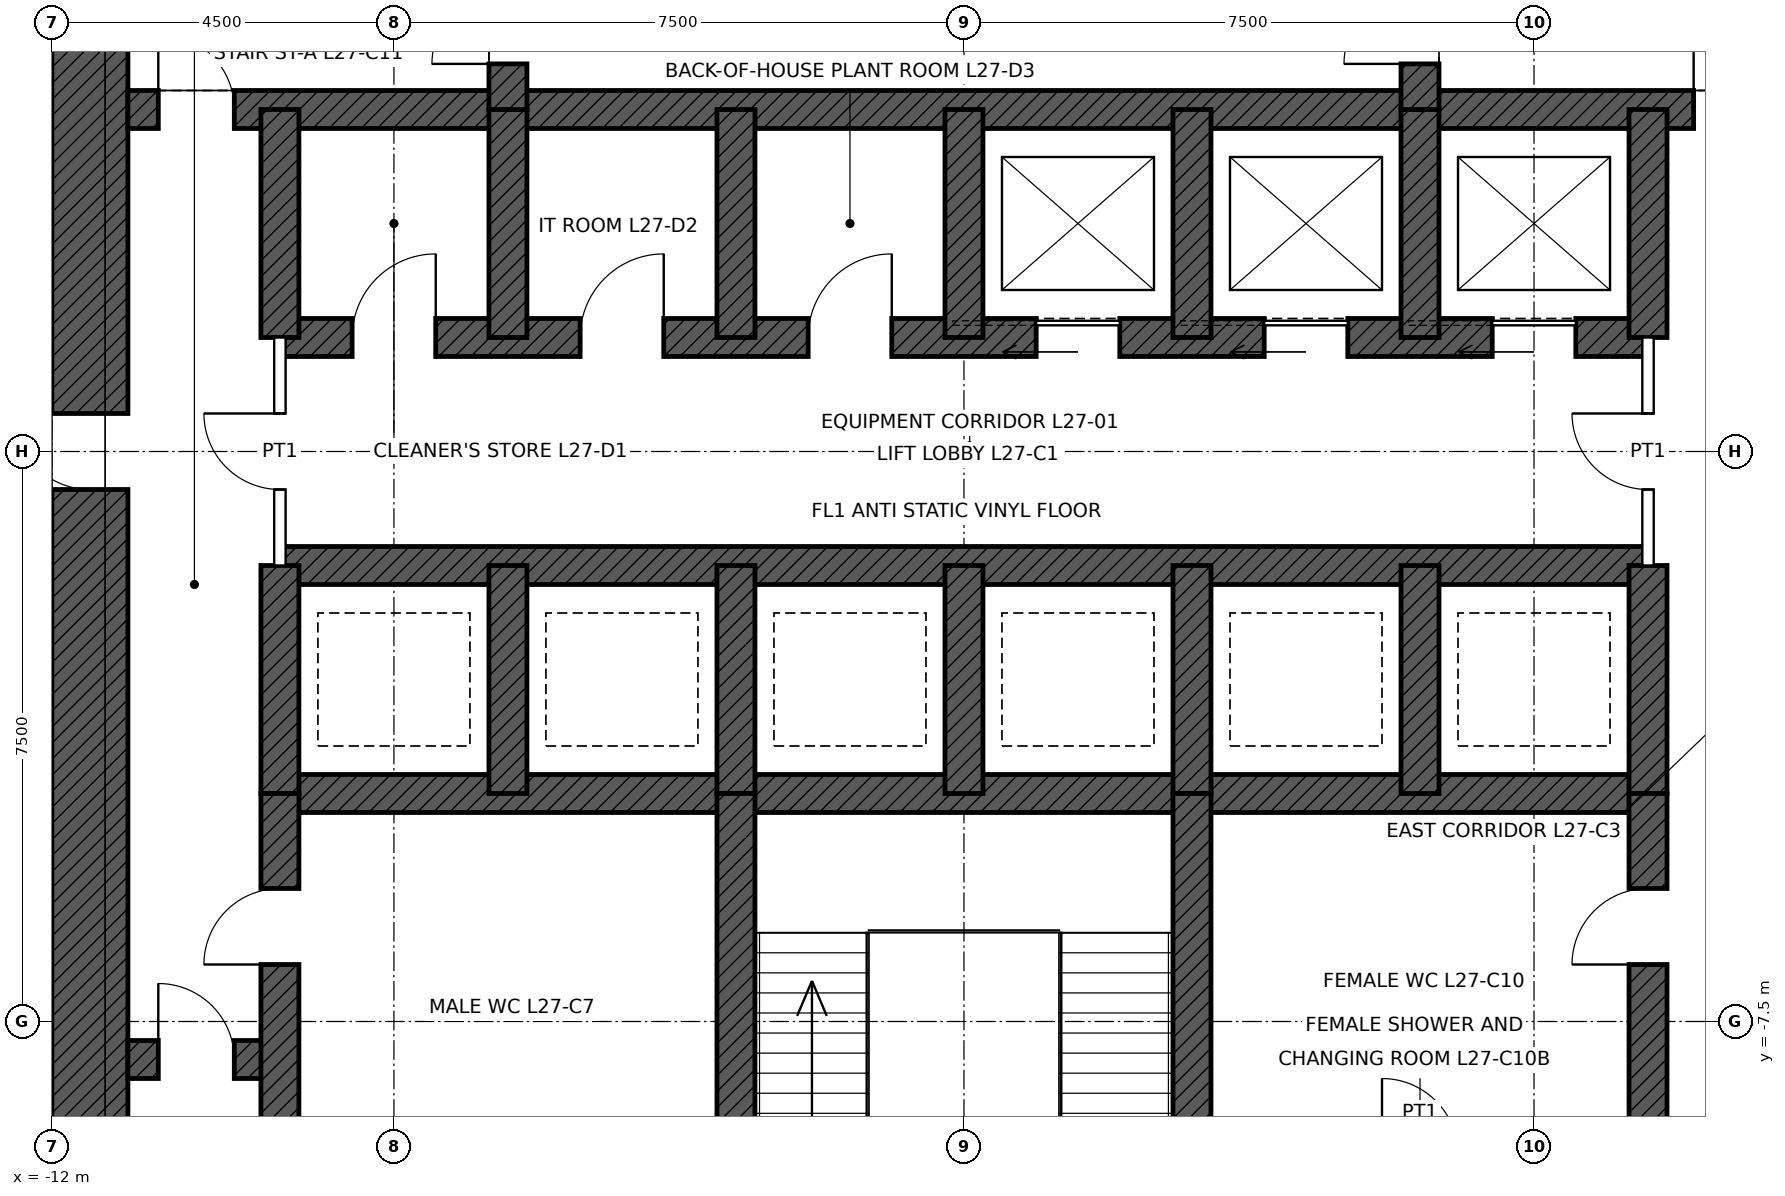
"""IFC4 building model, lengths in metres.
Left out: names, types, materials, properties, quantities, classifications, styles, units other than length and angle.
Written with IfcOpenShell. Run it as: python <this file> out.ifc"""

import sys

from ifc_helpers import new_model, si_unit, direction, frame, frame_2d, origin, place, context, subcontext, project, spatial, rectangle, extrude, element, fill, save


model = new_model("IFC4")
c1 = context("Model", 3, precision=1e-05, world=origin(), true_north=direction((0.0, 1.0)))
c2 = subcontext(c1, "Body", "Model", "MODEL_VIEW")
j1 = project(units=[si_unit("LENGTHUNIT", "METRE"), si_unit("PLANEANGLEUNIT", "RADIAN")], contexts=[c1])
p1 = place(None, origin())
s1 = spatial("IfcSite", under=j1, at=p1, CompositionType="ELEMENT")
p2 = place(p1, origin())
s2 = spatial("IfcBuilding", under=s1, at=p2, CompositionType="ELEMENT")
p3 = place(p2, frame((0.0, 0.0, 135.9)))
s3 = spatial("IfcBuildingStorey", under=s2, at=p3, CompositionType="ELEMENT", Elevation=135.9)
p4 = place(p3, frame((-11.5, -11.0, 0.0), z_axis=(0.0, 0.0, 1.0), x_axis=(0.0, 1.0, 0.0)))
e1 = element("IfcWall", 1, at=p4, inside=s3, PredefinedType="SHEAR", context=c2, shape_type="SweptSolid", body=[
    extrude(rectangle(XDim=22.0, YDim=1.0, at=frame_2d((11.0, 0.0))), origin(), (0.0, 0.0, 1.0), 4.5),
])
p5 = place(p4, frame((10.5, 0.0, 0.0)))
e2 = element("IfcOpeningElement", 2, at=p5, cuts=e1, PredefinedType="OPENING", context=c2, shape_type="SweptSolid", body=[
    extrude(rectangle(XDim=1.0, YDim=2.4, at=frame_2d((0.5, 1.2))), frame((0.0, 0.51, 0.0), z_axis=(0.0, -1.0, 0.0), x_axis=(1.0, 0.0, 0.0)), (0.0, 0.0, 1.0), 1.02),
])
p6 = place(p3, frame((-11.0, 4.5, 0.0), z_axis=(0.0, 0.0, 1.0), x_axis=(1.0, 0.0, 0.0)))
e3 = element("IfcWall", 3, at=p6, inside=s3, PredefinedType="SHEAR", context=c2, shape_type="SweptSolid", body=[
    extrude(rectangle(XDim=22.0, YDim=0.5, at=frame_2d((11.0, 0.0))), origin(), (0.0, 0.0, 1.0), 4.5),
])
p7 = place(p6, frame((0.4, 0.0, 0.0)))
e4 = element("IfcOpeningElement", 4, at=p7, cuts=e3, PredefinedType="OPENING", context=c2, shape_type="SweptSolid", body=[
    extrude(rectangle(XDim=1.0, YDim=2.1, at=frame_2d((0.5, 1.05))), frame((0.0, 0.26, 0.0), z_axis=(0.0, -1.0, 0.0), x_axis=(1.0, 0.0, 0.0)), (0.0, 0.0, 1.0), 0.52),
])
p8 = place(p6, frame((20.6, 0.0, 0.0)))
e5 = element("IfcOpeningElement", 5, at=p8, cuts=e3, PredefinedType="OPENING", context=c2, shape_type="SweptSolid", body=[
    extrude(rectangle(XDim=1.0, YDim=2.1, at=frame_2d((0.5, 1.05))), frame((0.0, 0.26, 0.0), z_axis=(0.0, -1.0, 0.0), x_axis=(1.0, 0.0, 0.0)), (0.0, 0.0, 1.0), 0.52),
])
p9 = place(p3, frame((-9.0, 1.5, 0.0), z_axis=(0.0, 0.0, 1.0), x_axis=(1.0, 0.0, 0.0)))
e6 = element("IfcWall", 6, at=p9, inside=s3, PredefinedType="SHEAR", context=c2, shape_type="SweptSolid", body=[
    extrude(rectangle(XDim=18.0, YDim=0.5, at=frame_2d((9.0, 0.0))), origin(), (0.0, 0.0, 1.0), 4.5),
])
p10 = place(p9, frame((9.95, 0.0, 0.0)))
e7 = element("IfcOpeningElement", 7, at=p10, cuts=e6, PredefinedType="OPENING", context=c2, shape_type="SweptSolid", body=[
    extrude(rectangle(XDim=1.1, YDim=2.1, at=frame_2d((0.55, 1.05))), frame((0.0, 0.26, 0.0), z_axis=(0.0, -1.0, 0.0), x_axis=(1.0, 0.0, 0.0)), (0.0, 0.0, 1.0), 0.52),
])
p11 = place(p9, frame((12.95, 0.0, 0.0)))
e8 = element("IfcOpeningElement", 8, at=p11, cuts=e6, PredefinedType="OPENING", context=c2, shape_type="SweptSolid", body=[
    extrude(rectangle(XDim=1.1, YDim=2.1, at=frame_2d((0.55, 1.05))), frame((0.0, 0.26, 0.0), z_axis=(0.0, -1.0, 0.0), x_axis=(1.0, 0.0, 0.0)), (0.0, 0.0, 1.0), 0.52),
])
p12 = place(p9, frame((15.95, 0.0, 0.0)))
e9 = element("IfcOpeningElement", 9, at=p12, cuts=e6, PredefinedType="OPENING", context=c2, shape_type="SweptSolid", body=[
    extrude(rectangle(XDim=1.1, YDim=2.1, at=frame_2d((0.55, 1.05))), frame((0.0, 0.26, 0.0), z_axis=(0.0, -1.0, 0.0), x_axis=(1.0, 0.0, 0.0)), (0.0, 0.0, 1.0), 0.52),
])
p13 = place(p9, frame((0.95, 0.0, 0.0)))
e10 = element("IfcOpeningElement", 10, at=p13, cuts=e6, PredefinedType="OPENING", context=c2, shape_type="SweptSolid", body=[
    extrude(rectangle(XDim=1.1, YDim=2.1, at=frame_2d((0.55, 1.05))), frame((0.0, 0.26, 0.0), z_axis=(0.0, -1.0, 0.0), x_axis=(1.0, 0.0, 0.0)), (0.0, 0.0, 1.0), 0.52),
])
p14 = place(p9, frame((3.95, 0.0, 0.0)))
e11 = element("IfcOpeningElement", 11, at=p14, cuts=e6, PredefinedType="OPENING", context=c2, shape_type="SweptSolid", body=[
    extrude(rectangle(XDim=1.1, YDim=2.1, at=frame_2d((0.55, 1.05))), frame((0.0, 0.26, 0.0), z_axis=(0.0, -1.0, 0.0), x_axis=(1.0, 0.0, 0.0)), (0.0, 0.0, 1.0), 0.52),
])
p15 = place(p9, frame((6.95, 0.0, 0.0)))
e12 = element("IfcOpeningElement", 12, at=p15, cuts=e6, PredefinedType="OPENING", context=c2, shape_type="SweptSolid", body=[
    extrude(rectangle(XDim=1.1, YDim=2.1, at=frame_2d((0.55, 1.05))), frame((0.0, 0.26, 0.0), z_axis=(0.0, -1.0, 0.0), x_axis=(1.0, 0.0, 0.0)), (0.0, 0.0, 1.0), 0.52),
])
for number, where, z_axis, x_axis in (
    (13, (-9.0, -1.5, 0.0), (0.0, 0.0, 1.0), (1.0, 0.0, 0.0)),
    (14, (-9.0, -4.5, 0.0), (0.0, 0.0, 1.0), (1.0, 0.0, 0.0)),
):
    element("IfcWall", number, at=place(p3, frame(where, z_axis=z_axis, x_axis=x_axis)), inside=s3, PredefinedType="SHEAR", context=c2, shape_type="SweptSolid", body=[
        extrude(rectangle(XDim=18.0, YDim=0.5, at=frame_2d((9.0, 0.0))), origin(), (0.0, 0.0, 1.0), 4.5),
    ])
p16 = place(p3, frame((-11.0, -8.0, 0.0), z_axis=(0.0, 0.0, 1.0), x_axis=(1.0, 0.0, 0.0)))
e15 = element("IfcWall", 15, at=p16, inside=s3, PredefinedType="SHEAR", context=c2, shape_type="SweptSolid", body=[
    extrude(rectangle(XDim=2.0, YDim=0.5, at=frame_2d((1.0, 0.0))), origin(), (0.0, 0.0, 1.0), 4.5),
])
p17 = place(p16, frame((0.4, 0.0, 0.0)))
e16 = element("IfcOpeningElement", 16, at=p17, cuts=e15, PredefinedType="OPENING", context=c2, shape_type="SweptSolid", body=[
    extrude(rectangle(XDim=1.0, YDim=2.1, at=frame_2d((0.5, 1.05))), frame((0.0, 0.26, 0.0), z_axis=(0.0, -1.0, 0.0), x_axis=(1.0, 0.0, 0.0)), (0.0, 0.0, 1.0), 0.52),
])
for number, where, z_axis, x_axis in (
    (17, (-9.0, 1.5, 0.0), (0.0, 0.0, 1.0), (0.0, 1.0, 0.0)),
    (18, (9.0, 1.5, 0.0), (0.0, 0.0, 1.0), (0.0, 1.0, 0.0)),
    (19, (-9.0, -4.5, 0.0), (0.0, 0.0, 1.0), (0.0, 1.0, 0.0)),
    (20, (9.0, -4.5, 0.0), (0.0, 0.0, 1.0), (0.0, 1.0, 0.0)),
    (21, (-6.0, 1.5, 0.0), (0.0, 0.0, 1.0), (0.0, 1.0, 0.0)),
    (22, (-3.0, 1.5, 0.0), (0.0, 0.0, 1.0), (0.0, 1.0, 0.0)),
    (23, (0.0, 1.5, 0.0), (0.0, 0.0, 1.0), (0.0, 1.0, 0.0)),
    (24, (3.0, 1.5, 0.0), (0.0, 0.0, 1.0), (0.0, 1.0, 0.0)),
    (25, (6.0, 1.5, 0.0), (0.0, 0.0, 1.0), (0.0, 1.0, 0.0)),
    (26, (-6.0, -4.5, 0.0), (0.0, 0.0, 1.0), (0.0, 1.0, 0.0)),
    (27, (-3.0, -4.5, 0.0), (0.0, 0.0, 1.0), (0.0, 1.0, 0.0)),
    (28, (0.0, -4.5, 0.0), (0.0, 0.0, 1.0), (0.0, 1.0, 0.0)),
    (29, (3.0, -4.5, 0.0), (0.0, 0.0, 1.0), (0.0, 1.0, 0.0)),
    (30, (6.0, -4.5, 0.0), (0.0, 0.0, 1.0), (0.0, 1.0, 0.0)),
):
    element("IfcWall", number, at=place(p3, frame(where, z_axis=z_axis, x_axis=x_axis)), inside=s3, PredefinedType="SHEAR", context=c2, shape_type="SweptSolid", body=[
        extrude(rectangle(XDim=3.0, YDim=0.5, at=frame_2d((1.5, 0.0))), origin(), (0.0, 0.0, 1.0), 4.5),
    ])
p18 = place(p3, frame((-6.0, 4.5, 0.0), z_axis=(0.0, 0.0, 1.0), x_axis=(0.0, 1.0, 0.0)))
e31 = element("IfcWall", 31, at=p18, inside=s3, PredefinedType="SHEAR", context=c2, shape_type="SweptSolid", body=[
    extrude(rectangle(XDim=6.5, YDim=0.5, at=frame_2d((3.25, 0.0))), origin(), (0.0, 0.0, 1.0), 4.5),
])
p19 = place(p18, frame((0.6, 0.0, 0.0)))
e32 = element("IfcOpeningElement", 32, at=p19, cuts=e31, PredefinedType="OPENING", context=c2, shape_type="SweptSolid", body=[
    extrude(rectangle(XDim=1.0, YDim=2.1, at=frame_2d((0.5, 1.05))), frame((0.0, 0.26, 0.0), z_axis=(0.0, -1.0, 0.0), x_axis=(1.0, 0.0, 0.0)), (0.0, 0.0, 1.0), 0.52),
])
p20 = place(p3, frame((6.0, 4.5, 0.0), z_axis=(0.0, 0.0, 1.0), x_axis=(0.0, 1.0, 0.0)))
e33 = element("IfcWall", 33, at=p20, inside=s3, PredefinedType="SHEAR", context=c2, shape_type="SweptSolid", body=[
    extrude(rectangle(XDim=6.5, YDim=0.5, at=frame_2d((3.25, 0.0))), origin(), (0.0, 0.0, 1.0), 4.5),
])
p21 = place(p20, frame((0.6, 0.0, 0.0)))
e34 = element("IfcOpeningElement", 34, at=p21, cuts=e33, PredefinedType="OPENING", context=c2, shape_type="SweptSolid", body=[
    extrude(rectangle(XDim=1.0, YDim=2.1, at=frame_2d((0.5, 1.05))), frame((0.0, 0.26, 0.0), z_axis=(0.0, -1.0, 0.0), x_axis=(1.0, 0.0, 0.0)), (0.0, 0.0, 1.0), 0.52),
])
p22 = place(p3, frame((-9.0, -11.0, 0.0), z_axis=(0.0, 0.0, 1.0), x_axis=(0.0, 1.0, 0.0)))
e35 = element("IfcWall", 35, at=p22, inside=s3, PredefinedType="SHEAR", context=c2, shape_type="SweptSolid", body=[
    extrude(rectangle(XDim=6.5, YDim=0.5, at=frame_2d((3.25, 0.0))), origin(), (0.0, 0.0, 1.0), 4.5),
])
p23 = place(p22, frame((4.25, 0.0, 0.0)))
e36 = element("IfcOpeningElement", 36, at=p23, cuts=e35, PredefinedType="OPENING", context=c2, shape_type="SweptSolid", body=[
    extrude(rectangle(XDim=1.0, YDim=2.1, at=frame_2d((0.5, 1.05))), frame((0.0, 0.26, 0.0), z_axis=(0.0, -1.0, 0.0), x_axis=(1.0, 0.0, 0.0)), (0.0, 0.0, 1.0), 0.52),
])
p24 = place(p3, frame((9.0, -11.0, 0.0), z_axis=(0.0, 0.0, 1.0), x_axis=(0.0, 1.0, 0.0)))
e37 = element("IfcWall", 37, at=p24, inside=s3, PredefinedType="SHEAR", context=c2, shape_type="SweptSolid", body=[
    extrude(rectangle(XDim=6.5, YDim=0.5, at=frame_2d((3.25, 0.0))), origin(), (0.0, 0.0, 1.0), 4.5),
])
p25 = place(p24, frame((4.25, 0.0, 0.0)))
e38 = element("IfcOpeningElement", 38, at=p25, cuts=e37, PredefinedType="OPENING", context=c2, shape_type="SweptSolid", body=[
    extrude(rectangle(XDim=1.0, YDim=2.1, at=frame_2d((0.5, 1.05))), frame((0.0, 0.26, 0.0), z_axis=(0.0, -1.0, 0.0), x_axis=(1.0, 0.0, 0.0)), (0.0, 0.0, 1.0), 0.52),
])
for number, where, z_axis, x_axis in (
    (39, (-3.0, -11.0, 0.0), (0.0, 0.0, 1.0), (0.0, 1.0, 0.0)),
    (40, (3.0, -11.0, 0.0), (0.0, 0.0, 1.0), (0.0, 1.0, 0.0)),
):
    element("IfcWall", number, at=place(p3, frame(where, z_axis=z_axis, x_axis=x_axis)), inside=s3, PredefinedType="SHEAR", context=c2, shape_type="SweptSolid", body=[
        extrude(rectangle(XDim=6.5, YDim=0.5, at=frame_2d((3.25, 0.0))), origin(), (0.0, 0.0, 1.0), 4.5),
    ])
p26 = place(p3, frame((-9.0, -1.5, 0.0), z_axis=(0.0, 0.0, 1.0), x_axis=(0.0, 1.0, 0.0)))
e41 = element("IfcWall", 41, at=p26, inside=s3, PredefinedType="PARTITIONING", context=c2, shape_type="SweptSolid", body=[
    extrude(rectangle(XDim=3.0, YDim=0.15, at=frame_2d((1.5, 0.0))), origin(), (0.0, 0.0, 1.0), 4.25),
])
p27 = place(p26, frame((1.0, 0.0, 0.0)))
e42 = element("IfcOpeningElement", 42, at=p27, cuts=e41, PredefinedType="OPENING", context=c2, shape_type="SweptSolid", body=[
    extrude(rectangle(XDim=1.0, YDim=2.4, at=frame_2d((0.5, 1.2))), frame((0.0, 0.085, 0.0), z_axis=(0.0, -1.0, 0.0), x_axis=(1.0, 0.0, 0.0)), (0.0, 0.0, 1.0), 0.17),
])
p28 = place(p3, frame((9.0, -1.5, 0.0), z_axis=(0.0, 0.0, 1.0), x_axis=(0.0, 1.0, 0.0)))
e43 = element("IfcWall", 43, at=p28, inside=s3, PredefinedType="PARTITIONING", context=c2, shape_type="SweptSolid", body=[
    extrude(rectangle(XDim=3.0, YDim=0.15, at=frame_2d((1.5, 0.0))), origin(), (0.0, 0.0, 1.0), 4.25),
])
p29 = place(p28, frame((1.0, 0.0, 0.0)))
e44 = element("IfcOpeningElement", 44, at=p29, cuts=e43, PredefinedType="OPENING", context=c2, shape_type="SweptSolid", body=[
    extrude(rectangle(XDim=1.0, YDim=2.4, at=frame_2d((0.5, 1.2))), frame((0.0, 0.085, 0.0), z_axis=(0.0, -1.0, 0.0), x_axis=(1.0, 0.0, 0.0)), (0.0, 0.0, 1.0), 0.17),
])
p30 = place(p7, origin())
e45 = element("IfcDoor", 45, at=p30, inside=s3, OperationType="SINGLE_SWING_LEFT", PredefinedType="DOOR", context=c2, shape_type="SweptSolid", body=[
    extrude(rectangle(XDim=1.0, YDim=2.1, at=frame_2d((0.5, 1.05))), frame((0.0, 0.025, 0.0), z_axis=(0.0, -1.0, 0.0), x_axis=(1.0, 0.0, 0.0)), (0.0, 0.0, 1.0), 0.05),
])
fill(e4, e45)
p31 = place(p8, origin())
e46 = element("IfcDoor", 46, at=p31, inside=s3, OperationType="SINGLE_SWING_LEFT", PredefinedType="DOOR", context=c2, shape_type="SweptSolid", body=[
    extrude(rectangle(XDim=1.0, YDim=2.1, at=frame_2d((0.5, 1.05))), frame((0.0, 0.025, 0.0), z_axis=(0.0, -1.0, 0.0), x_axis=(1.0, 0.0, 0.0)), (0.0, 0.0, 1.0), 0.05),
])
fill(e5, e46)
p32 = place(p19, origin())
e47 = element("IfcDoor", 47, at=p32, inside=s3, OperationType="SINGLE_SWING_LEFT", PredefinedType="DOOR", context=c2, shape_type="SweptSolid", body=[
    extrude(rectangle(XDim=1.0, YDim=2.1, at=frame_2d((0.5, 1.05))), frame((0.0, 0.025, 0.0), z_axis=(0.0, -1.0, 0.0), x_axis=(1.0, 0.0, 0.0)), (0.0, 0.0, 1.0), 0.05),
])
fill(e32, e47)
p33 = place(p21, origin())
e48 = element("IfcDoor", 48, at=p33, inside=s3, OperationType="SINGLE_SWING_LEFT", PredefinedType="DOOR", context=c2, shape_type="SweptSolid", body=[
    extrude(rectangle(XDim=1.0, YDim=2.1, at=frame_2d((0.5, 1.05))), frame((0.0, 0.025, 0.0), z_axis=(0.0, -1.0, 0.0), x_axis=(1.0, 0.0, 0.0)), (0.0, 0.0, 1.0), 0.05),
])
fill(e34, e48)
p34 = place(p5, origin())
e49 = element("IfcDoor", 49, at=p34, inside=s3, OperationType="SINGLE_SWING_RIGHT", PredefinedType="DOOR", context=c2, shape_type="SweptSolid", body=[
    extrude(rectangle(XDim=1.0, YDim=2.4, at=frame_2d((0.5, 1.2))), frame((0.0, 0.485, 0.0), z_axis=(0.0, -1.0, 0.0), x_axis=(1.0, 0.0, 0.0)), (0.0, 0.0, 1.0), 0.05),
])
fill(e2, e49)
p35 = place(p23, origin())
e50 = element("IfcDoor", 50, at=p35, inside=s3, OperationType="SINGLE_SWING_LEFT", PredefinedType="DOOR", context=c2, shape_type="SweptSolid", body=[
    extrude(rectangle(XDim=1.0, YDim=2.1, at=frame_2d((0.5, 1.05))), frame((0.0, 0.025, 0.0), z_axis=(0.0, -1.0, 0.0), x_axis=(1.0, 0.0, 0.0)), (0.0, 0.0, 1.0), 0.05),
])
fill(e36, e50)
p36 = place(p25, origin())
e51 = element("IfcDoor", 51, at=p36, inside=s3, OperationType="SINGLE_SWING_LEFT", PredefinedType="DOOR", context=c2, shape_type="SweptSolid", body=[
    extrude(rectangle(XDim=1.0, YDim=2.1, at=frame_2d((0.5, 1.05))), frame((0.0, 0.025, 0.0), z_axis=(0.0, -1.0, 0.0), x_axis=(1.0, 0.0, 0.0)), (0.0, 0.0, 1.0), 0.05),
])
fill(e38, e51)
p37 = place(p17, origin())
e52 = element("IfcDoor", 52, at=p37, inside=s3, OperationType="SINGLE_SWING_LEFT", PredefinedType="DOOR", context=c2, shape_type="SweptSolid", body=[
    extrude(rectangle(XDim=1.0, YDim=2.1, at=frame_2d((0.5, 1.05))), frame((0.0, 0.025, 0.0), z_axis=(0.0, -1.0, 0.0), x_axis=(1.0, 0.0, 0.0)), (0.0, 0.0, 1.0), 0.05),
])
fill(e16, e52)
p38 = place(p10, origin())
e53 = element("IfcDoor", 53, at=p38, inside=s3, OperationType="SLIDING_TO_LEFT", PredefinedType="DOOR", context=c2, shape_type="SweptSolid", body=[
    extrude(rectangle(XDim=1.1, YDim=2.1, at=frame_2d((0.55, 1.05))), frame((0.0, 0.025, 0.0), z_axis=(0.0, -1.0, 0.0), x_axis=(1.0, 0.0, 0.0)), (0.0, 0.0, 1.0), 0.05),
])
fill(e7, e53)
p39 = place(p11, origin())
e54 = element("IfcDoor", 54, at=p39, inside=s3, OperationType="SLIDING_TO_LEFT", PredefinedType="DOOR", context=c2, shape_type="SweptSolid", body=[
    extrude(rectangle(XDim=1.1, YDim=2.1, at=frame_2d((0.55, 1.05))), frame((0.0, 0.025, 0.0), z_axis=(0.0, -1.0, 0.0), x_axis=(1.0, 0.0, 0.0)), (0.0, 0.0, 1.0), 0.05),
])
fill(e8, e54)
p40 = place(p12, origin())
e55 = element("IfcDoor", 55, at=p40, inside=s3, OperationType="SLIDING_TO_LEFT", PredefinedType="DOOR", context=c2, shape_type="SweptSolid", body=[
    extrude(rectangle(XDim=1.1, YDim=2.1, at=frame_2d((0.55, 1.05))), frame((0.0, 0.025, 0.0), z_axis=(0.0, -1.0, 0.0), x_axis=(1.0, 0.0, 0.0)), (0.0, 0.0, 1.0), 0.05),
])
fill(e9, e55)
p41 = place(p27, origin())
e56 = element("IfcDoor", 56, at=p41, inside=s3, OperationType="SINGLE_SWING_RIGHT", PredefinedType="DOOR", context=c2, shape_type="SweptSolid", body=[
    extrude(rectangle(XDim=1.0, YDim=2.4, at=frame_2d((0.5, 1.2))), frame((0.0, 0.025, 0.0), z_axis=(0.0, -1.0, 0.0), x_axis=(1.0, 0.0, 0.0)), (0.0, 0.0, 1.0), 0.05),
])
fill(e42, e56)
p42 = place(p29, origin())
e57 = element("IfcDoor", 57, at=p42, inside=s3, OperationType="SINGLE_SWING_RIGHT", PredefinedType="DOOR", context=c2, shape_type="SweptSolid", body=[
    extrude(rectangle(XDim=1.0, YDim=2.4, at=frame_2d((0.5, 1.2))), frame((0.0, 0.025, 0.0), z_axis=(0.0, -1.0, 0.0), x_axis=(1.0, 0.0, 0.0)), (0.0, 0.0, 1.0), 0.05),
])
fill(e44, e57)
p43 = place(p13, origin())
e58 = element("IfcDoor", 58, at=p43, inside=s3, OperationType="SINGLE_SWING_RIGHT", PredefinedType="DOOR", context=c2, shape_type="SweptSolid", body=[
    extrude(rectangle(XDim=1.1, YDim=2.1, at=frame_2d((0.55, 1.05))), frame((0.0, 0.025, 0.0), z_axis=(0.0, -1.0, 0.0), x_axis=(1.0, 0.0, 0.0)), (0.0, 0.0, 1.0), 0.05),
])
fill(e10, e58)
p44 = place(p14, origin())
e59 = element("IfcDoor", 59, at=p44, inside=s3, OperationType="SINGLE_SWING_RIGHT", PredefinedType="DOOR", context=c2, shape_type="SweptSolid", body=[
    extrude(rectangle(XDim=1.1, YDim=2.1, at=frame_2d((0.55, 1.05))), frame((0.0, 0.025, 0.0), z_axis=(0.0, -1.0, 0.0), x_axis=(1.0, 0.0, 0.0)), (0.0, 0.0, 1.0), 0.05),
])
fill(e11, e59)
p45 = place(p15, origin())
e60 = element("IfcDoor", 60, at=p45, inside=s3, OperationType="SINGLE_SWING_RIGHT", PredefinedType="DOOR", context=c2, shape_type="SweptSolid", body=[
    extrude(rectangle(XDim=1.1, YDim=2.1, at=frame_2d((0.55, 1.05))), frame((0.0, 0.025, 0.0), z_axis=(0.0, -1.0, 0.0), x_axis=(1.0, 0.0, 0.0)), (0.0, 0.0, 1.0), 0.05),
])
fill(e12, e60)
save(model, sys.argv[1])
